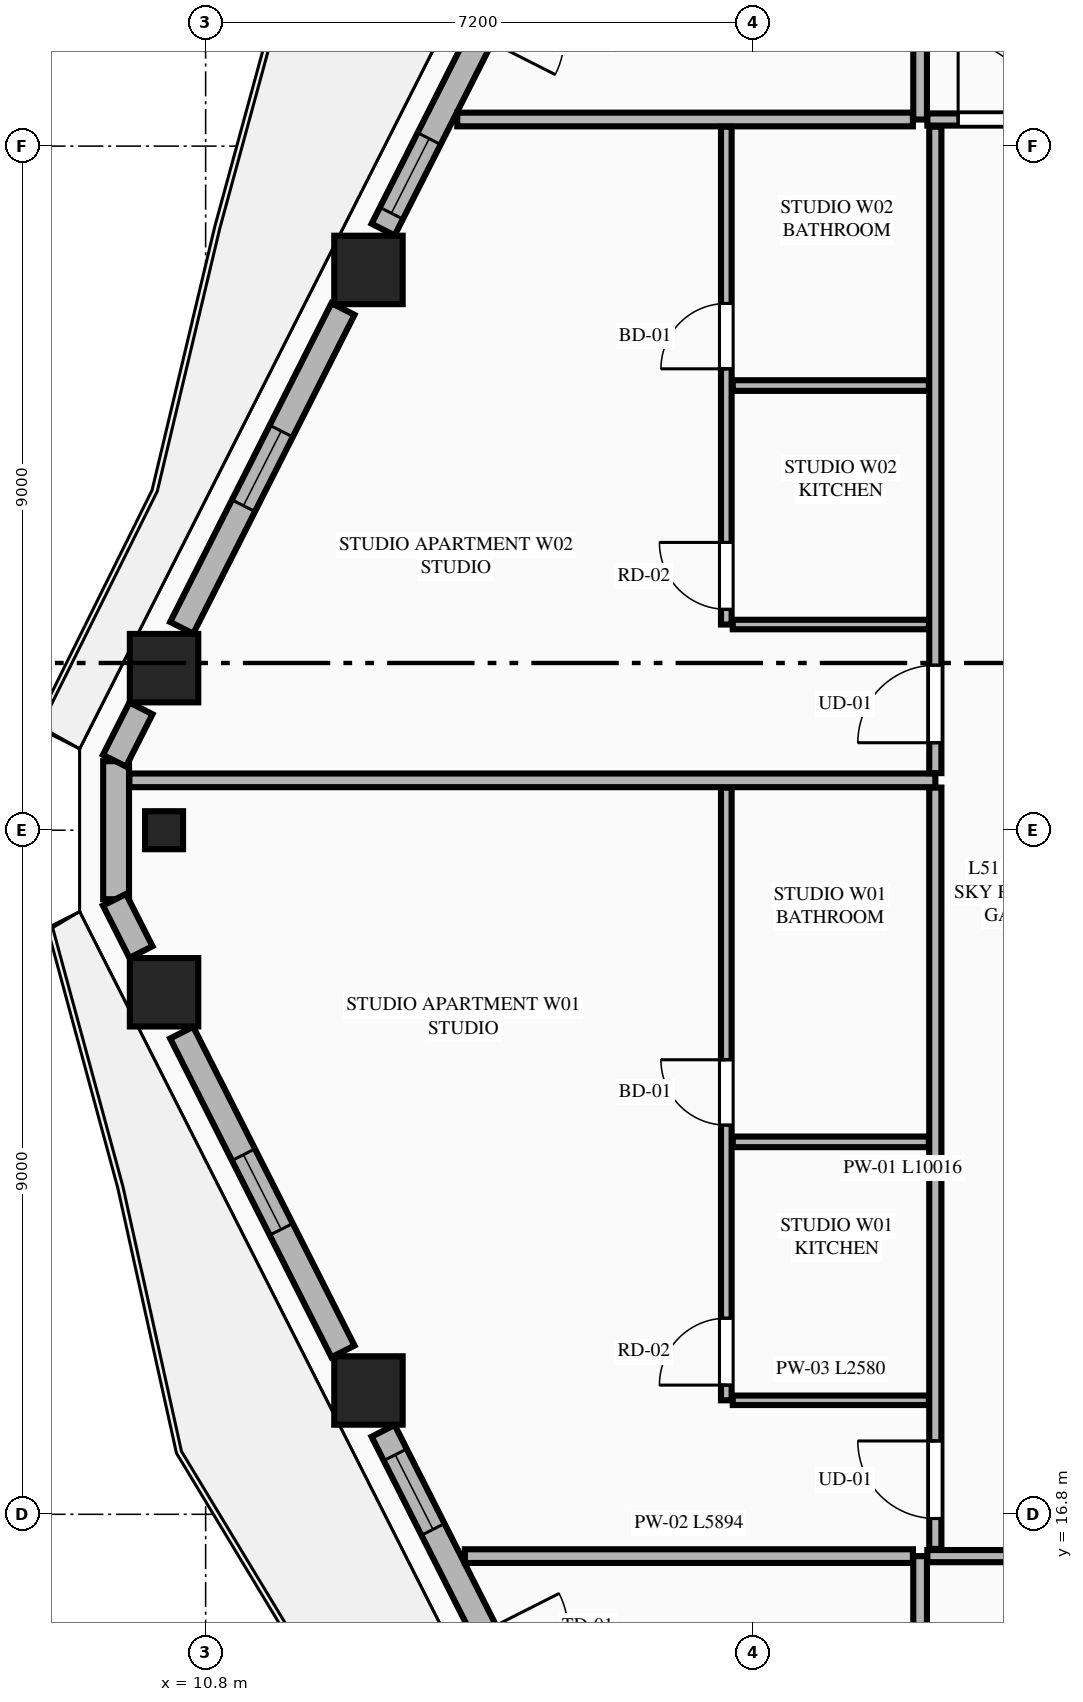
"""IFC4 building model, lengths in metres.
Left out: names, types, materials, properties, quantities, classifications, styles, units other than length and angle.
Written with IfcOpenShell. Run it as: python <this file> out.ifc"""

import sys

from ifc_helpers import new_model, si_unit, direction, frame, frame_2d, origin, origin_2d, place, context, subcontext, project, spatial, rectangle, extrude, element, fill, save


model = new_model("IFC4")
c1 = context("Model", 3, precision=1e-05, world=origin(), true_north=direction((0.0, 1.0)))
c2 = subcontext(c1, "Body", "Model", "MODEL_VIEW")
j1 = project(units=[si_unit("LENGTHUNIT", "METRE"), si_unit("PLANEANGLEUNIT", "RADIAN")], contexts=[c1])
p1 = place(None, origin())
s1 = spatial("IfcSite", under=j1, at=p1, CompositionType="ELEMENT")
p2 = place(p1, origin())
s2 = spatial("IfcBuilding", under=s1, at=p2, CompositionType="ELEMENT")
p3 = place(p2, frame((0.0, 0.0, 193.2)))
s3 = spatial("IfcBuildingStorey", under=s2, at=p3, CompositionType="ELEMENT", Elevation=193.2)
for number, where, z_axis, x_axis in (
    (1, (12.942, 33.171, 0.0), (0.0, 0.0, 1.0), (1.0, 0.0, 0.0)),
    (2, (10.253, 27.932, 0.0), (0.0, 0.0, 1.0), (1.0, 0.0, 0.0)),
    (3, (10.253, 23.668, 0.0), (0.0, 0.0, 1.0), (1.0, 0.0, 0.0)),
    (4, (12.942, 18.429, 0.0), (0.0, 0.0, 1.0), (1.0, 0.0, 0.0)),
):
    element("IfcColumn", number, at=place(p3, frame(where, z_axis=z_axis, x_axis=x_axis)), inside=s3, PredefinedType="COLUMN", context=c2, shape_type="SweptSolid", body=[
        extrude(rectangle(XDim=0.9, YDim=0.9, at=origin_2d()), origin(), (0.0, 0.0, 1.0), 3.55),
    ])
p4 = place(p3, frame((10.253, 25.8, 0.0), z_axis=(0.0, 0.0, 1.0), x_axis=(0.0, -1.0, 0.0)))
e5 = element("IfcColumn", 5, at=p4, inside=s3, PredefinedType="PILASTER", context=c2, shape_type="SweptSolid", body=[
    extrude(rectangle(XDim=0.5, YDim=0.35, at=origin_2d()), origin(), (0.0, 0.0, 1.0), 3.55),
])
p5 = place(p3, frame((9.622, 26.708, 0.0), z_axis=(0.0, 0.0, 1.0), x_axis=(0.0, -1.0, 0.0)))
e6 = element("IfcWall", 6, at=p5, inside=s3, PredefinedType="STANDARD", context=c2, shape_type="SweptSolid", body=[
    extrude(rectangle(XDim=1.816, YDim=0.34, at=frame_2d((0.908, 0.0))), origin(), (0.0, 0.0, 1.0), 3.35),
])
p6 = place(p3, frame((15.352, 38.083, 0.0), z_axis=(0.0, 0.0, 1.0), x_axis=(-0.451524246964, -0.89225884944, 0.0)))
e7 = element("IfcWall", 7, at=p6, inside=s3, PredefinedType="STANDARD", context=c2, shape_type="SweptSolid", body=[
    extrude(rectangle(XDim=4.91, YDim=0.34, at=frame_2d((2.455, 0.0))), origin(), (0.0, 0.0, 1.0), 2.883),
])
p7 = place(p6, frame((0.968, 0.0, 0.0)))
e8 = element("IfcOpeningElement", 8, at=p7, cuts=e7, PredefinedType="OPENING", context=c2, shape_type="SweptSolid", body=[
    extrude(rectangle(XDim=1.1, YDim=2.25, at=frame_2d((0.55, 1.125))), frame((0.0, 0.18, 0.0), z_axis=(0.0, -1.0, 0.0), x_axis=(1.0, 0.0, 0.0)), (0.0, 0.0, 1.0), 0.36),
])
p8 = place(p6, frame((3.569, 0.0, 0.75)))
e9 = element("IfcOpeningElement", 9, at=p8, cuts=e7, PredefinedType="OPENING", context=c2, shape_type="SweptSolid", body=[
    extrude(rectangle(XDim=1.1, YDim=1.983, at=frame_2d((0.55, 0.991))), frame((0.0, 0.18, 0.0), z_axis=(0.0, -1.0, 0.0), x_axis=(1.0, 0.0, 0.0)), (0.0, 0.0, 1.0), 0.36),
])
p9 = place(p3, frame((12.607, 32.657, 0.0), z_axis=(0.0, 0.0, 1.0), x_axis=(-0.451426298588, -0.892308409096, 0.0)))
e10 = element("IfcWall", 10, at=p9, inside=s3, PredefinedType="STANDARD", context=c2, shape_type="SweptSolid", body=[
    extrude(rectangle(XDim=4.7, YDim=0.34, at=frame_2d((2.35, 0.0))), origin(), (0.0, 0.0, 1.0), 2.883),
])
p10 = place(p9, frame((1.8, 0.0, 0.75)))
e11 = element("IfcOpeningElement", 11, at=p10, cuts=e10, PredefinedType="OPENING", context=c2, shape_type="SweptSolid", body=[
    extrude(rectangle(XDim=1.1, YDim=1.983, at=frame_2d((0.55, 0.991))), frame((0.0, 0.18, 0.0), z_axis=(0.0, -1.0, 0.0), x_axis=(1.0, 0.0, 0.0)), (0.0, 0.0, 1.0), 0.36),
])
for number, where, z_axis, x_axis in (
    (12, (9.949, 27.403, 0.0), (0.0, 0.0, 1.0), (-0.451, -0.892, 0.0)),
    (13, (9.601, 24.885, 0.0), (0.0, 0.0, 1.0), (0.451, -0.892, 0.0)),
):
    element("IfcWall", number, at=place(p3, frame(where, z_axis=z_axis, x_axis=x_axis)), inside=s3, PredefinedType="STANDARD", context=c2, shape_type="SweptSolid", body=[
        extrude(rectangle(XDim=0.771, YDim=0.34, at=frame_2d((0.385, 0.0))), origin(), (0.0, 0.0, 1.0), 3.35),
    ])
p11 = place(p3, frame((10.485, 23.137, 0.0), z_axis=(0.0, 0.0, 1.0), x_axis=(0.451447222193, -0.892297823361, 0.0)))
e14 = element("IfcWall", 14, at=p11, inside=s3, PredefinedType="STANDARD", context=c2, shape_type="SweptSolid", body=[
    extrude(rectangle(XDim=4.7, YDim=0.34, at=frame_2d((2.35, 0.0))), origin(), (0.0, 0.0, 1.0), 2.883),
])
p12 = place(p11, frame((1.8, 0.0, 0.75)))
e15 = element("IfcOpeningElement", 15, at=p12, cuts=e14, PredefinedType="OPENING", context=c2, shape_type="SweptSolid", body=[
    extrude(rectangle(XDim=1.1, YDim=1.983, at=frame_2d((0.55, 0.991))), frame((0.0, 0.18, 0.0), z_axis=(0.0, -1.0, 0.0), x_axis=(1.0, 0.0, 0.0)), (0.0, 0.0, 1.0), 0.36),
])
p13 = place(p3, frame((13.135, 17.898, 0.0), z_axis=(0.0, 0.0, 1.0), x_axis=(0.451544279509, -0.892248711763, 0.0)))
e16 = element("IfcWall", 16, at=p13, inside=s3, PredefinedType="STANDARD", context=c2, shape_type="SweptSolid", body=[
    extrude(rectangle(XDim=4.91, YDim=0.34, at=frame_2d((2.455, 0.0))), origin(), (0.0, 0.0, 1.0), 2.883),
])
p14 = place(p13, frame((2.954, 0.0, 0.0)))
e17 = element("IfcOpeningElement", 17, at=p14, cuts=e16, PredefinedType="OPENING", context=c2, shape_type="SweptSolid", body=[
    extrude(rectangle(XDim=1.1, YDim=2.25, at=frame_2d((0.55, 1.125))), frame((0.0, 0.18, 0.0), z_axis=(0.0, -1.0, 0.0), x_axis=(1.0, 0.0, 0.0)), (0.0, 0.0, 1.0), 0.36),
])
p15 = place(p13, frame((0.353, 0.0, 0.75)))
e18 = element("IfcOpeningElement", 18, at=p15, cuts=e16, PredefinedType="OPENING", context=c2, shape_type="SweptSolid", body=[
    extrude(rectangle(XDim=1.1, YDim=1.983, at=frame_2d((0.55, 0.991))), frame((0.0, 0.18, 0.0), z_axis=(0.0, -1.0, 0.0), x_axis=(1.0, 0.0, 0.0)), (0.0, 0.0, 1.0), 0.36),
])
p16 = place(p3, frame((20.2, 5.968, 0.0), z_axis=(0.0, 0.0, 1.0), x_axis=(0.0, 1.0, 0.0)))
e19 = element("IfcWall", 19, at=p16, inside=s3, PredefinedType="PARTITIONING", context=c2, shape_type="SweptSolid", body=[
    extrude(rectangle(XDim=10.282, YDim=0.18, at=frame_2d((5.141, 0.0))), origin(), (0.0, 0.0, 1.0), 3.35),
])
p17 = place(p3, frame((20.295, 16.25, 0.0), z_axis=(0.0, 0.0, 1.0), x_axis=(1.0, 0.0, 0.0)))
e20 = element("IfcWall", 20, at=p17, inside=s3, PredefinedType="PARTITIONING", context=c2, shape_type="SweptSolid", body=[
    extrude(rectangle(XDim=24.21, YDim=0.16, at=frame_2d((12.105, 0.0))), origin(), (0.0, 0.0, 1.0), 3.35),
])
p18 = place(p17, frame((22.005, 0.0, 0.0)))
e21 = element("IfcOpeningElement", 21, at=p18, cuts=e20, PredefinedType="OPENING", context=c2, shape_type="SweptSolid", body=[
    extrude(rectangle(XDim=1.02, YDim=2.25, at=frame_2d((0.51, 1.125))), frame((0.0, 0.09, 0.0), z_axis=(0.0, -1.0, 0.0), x_axis=(1.0, 0.0, 0.0)), (0.0, 0.0, 1.0), 0.18),
])
p19 = place(p3, frame((20.2, 35.15, 0.0), z_axis=(0.0, 0.0, 1.0), x_axis=(0.0, 1.0, 0.0)))
e22 = element("IfcWall", 22, at=p19, inside=s3, PredefinedType="PARTITIONING", context=c2, shape_type="SweptSolid", body=[
    extrude(rectangle(XDim=10.482, YDim=0.18, at=frame_2d((5.241, 0.0))), origin(), (0.0, 0.0, 1.0), 3.35),
])
p20 = place(p3, frame((20.295, 35.15, 0.0), z_axis=(0.0, 0.0, 1.0), x_axis=(1.0, 0.0, 0.0)))
e23 = element("IfcWall", 23, at=p20, inside=s3, PredefinedType="PARTITIONING", context=c2, shape_type="SweptSolid", body=[
    extrude(rectangle(XDim=8.467, YDim=0.16, at=frame_2d((4.233, 0.0))), origin(), (0.0, 0.0, 1.0), 3.35),
])
p21 = place(p20, frame((0.405, 0.0, 0.0)))
e24 = element("IfcOpeningElement", 24, at=p21, cuts=e23, PredefinedType="OPENING", context=c2, shape_type="SweptSolid", body=[
    extrude(rectangle(XDim=1.02, YDim=2.25, at=frame_2d((0.51, 1.125))), frame((0.0, 0.09, 0.0), z_axis=(0.0, -1.0, 0.0), x_axis=(1.0, 0.0, 0.0)), (0.0, 0.0, 1.0), 0.18),
])
p22 = place(p3, frame((14.211, 16.25, 0.0), z_axis=(0.0, 0.0, 1.0), x_axis=(1.0, 0.0, 0.0)))
e25 = element("IfcWall", 25, at=p22, inside=s3, PredefinedType="PARTITIONING", context=c2, shape_type="SweptSolid", body=[
    extrude(rectangle(XDim=5.894, YDim=0.18, at=frame_2d((2.947, 0.0))), origin(), (0.0, 0.0, 1.0), 3.35),
])
p23 = place(p3, frame((14.11, 35.15, 0.0), z_axis=(0.0, 0.0, 1.0), x_axis=(1.0, 0.0, 0.0)))
e26 = element("IfcWall", 26, at=p23, inside=s3, PredefinedType="PARTITIONING", context=c2, shape_type="SweptSolid", body=[
    extrude(rectangle(XDim=5.995, YDim=0.18, at=frame_2d((2.998, 0.0))), origin(), (0.0, 0.0, 1.0), 3.35),
])
p24 = place(p3, frame((20.4, 16.345, 0.0), z_axis=(0.0, 0.0, 1.0), x_axis=(0.0, 1.0, 0.0)))
e27 = element("IfcWall", 27, at=p24, inside=s3, PredefinedType="PARTITIONING", context=c2, shape_type="SweptSolid", body=[
    extrude(rectangle(XDim=10.016, YDim=0.16, at=frame_2d((5.008, 0.0))), origin(), (0.0, 0.0, 1.0), 3.35),
])
p25 = place(p24, frame((0.4, 0.0, 0.0)))
e28 = element("IfcOpeningElement", 28, at=p25, cuts=e27, PredefinedType="OPENING", context=c2, shape_type="SweptSolid", body=[
    extrude(rectangle(XDim=1.02, YDim=2.25, at=frame_2d((0.51, 1.125))), frame((0.0, 0.09, 0.0), z_axis=(0.0, -1.0, 0.0), x_axis=(1.0, 0.0, 0.0)), (0.0, 0.0, 1.0), 0.18),
])
p26 = place(p3, frame((17.735, 18.3, 0.0), z_axis=(0.0, 0.0, 1.0), x_axis=(1.0, 0.0, 0.0)))
e29 = element("IfcWall", 29, at=p26, inside=s3, PredefinedType="PARTITIONING", context=c2, shape_type="SweptSolid", body=[
    extrude(rectangle(XDim=2.58, YDim=0.125, at=frame_2d((1.29, 0.0))), origin(), (0.0, 0.0, 1.0), 2.807),
])
p27 = place(p3, frame((17.65, 18.3, 0.0), z_axis=(0.0, 0.0, 1.0), x_axis=(0.0, 1.0, 0.0)))
e30 = element("IfcWall", 30, at=p27, inside=s3, PredefinedType="PLUMBINGWALL", context=c2, shape_type="SweptSolid", body=[
    extrude(rectangle(XDim=8.061, YDim=0.14, at=frame_2d((4.031, 0.0))), origin(), (0.0, 0.0, 1.0), 3.35),
])
p28 = place(p27, frame((3.62, 0.0, 0.0)))
e31 = element("IfcOpeningElement", 31, at=p28, cuts=e30, PredefinedType="OPENING", context=c2, shape_type="SweptSolid", body=[
    extrude(rectangle(XDim=0.86, YDim=2.1, at=frame_2d((0.43, 1.05))), frame((0.0, 0.08, 0.0), z_axis=(0.0, -1.0, 0.0), x_axis=(1.0, 0.0, 0.0)), (0.0, 0.0, 1.0), 0.16),
])
p29 = place(p27, frame((0.2, 0.0, 0.0)))
e32 = element("IfcOpeningElement", 32, at=p29, cuts=e30, PredefinedType="OPENING", context=c2, shape_type="SweptSolid", body=[
    extrude(rectangle(XDim=0.88, YDim=2.15, at=frame_2d((0.44, 1.075))), frame((0.0, 0.08, 0.0), z_axis=(0.0, -1.0, 0.0), x_axis=(1.0, 0.0, 0.0)), (0.0, 0.0, 1.0), 0.16),
])
p30 = place(p3, frame((17.735, 21.7, 0.0), z_axis=(0.0, 0.0, 1.0), x_axis=(1.0, 0.0, 0.0)))
e33 = element("IfcWall", 33, at=p30, inside=s3, PredefinedType="PLUMBINGWALL", context=c2, shape_type="SweptSolid", body=[
    extrude(rectangle(XDim=2.58, YDim=0.14, at=frame_2d((1.29, 0.0))), origin(), (0.0, 0.0, 1.0), 3.35),
])
p31 = place(p3, frame((9.797, 26.456, 0.0), z_axis=(0.0, 0.0, 1.0), x_axis=(1.0, 0.0, 0.0)))
e34 = element("IfcWall", 34, at=p31, inside=s3, PredefinedType="PARTITIONING", context=c2, shape_type="SweptSolid", body=[
    extrude(rectangle(XDim=10.603, YDim=0.18, at=frame_2d((5.301, 0.0))), origin(), (0.0, 0.0, 1.0), 3.35),
])
p32 = place(p3, frame((20.4, 26.551, 0.0), z_axis=(0.0, 0.0, 1.0), x_axis=(0.0, 1.0, 0.0)))
e35 = element("IfcWall", 35, at=p32, inside=s3, PredefinedType="PARTITIONING", context=c2, shape_type="SweptSolid", body=[
    extrude(rectangle(XDim=8.504, YDim=0.16, at=frame_2d((4.252, 0.0))), origin(), (0.0, 0.0, 1.0), 3.35),
])
p33 = place(p32, frame((0.4, 0.0, 0.0)))
e36 = element("IfcOpeningElement", 36, at=p33, cuts=e35, PredefinedType="OPENING", context=c2, shape_type="SweptSolid", body=[
    extrude(rectangle(XDim=1.02, YDim=2.25, at=frame_2d((0.51, 1.125))), frame((0.0, 0.09, 0.0), z_axis=(0.0, -1.0, 0.0), x_axis=(1.0, 0.0, 0.0)), (0.0, 0.0, 1.0), 0.18),
])
p34 = place(p3, frame((17.735, 28.506, 0.0), z_axis=(0.0, 0.0, 1.0), x_axis=(1.0, 0.0, 0.0)))
e37 = element("IfcWall", 37, at=p34, inside=s3, PredefinedType="PARTITIONING", context=c2, shape_type="SweptSolid", body=[
    extrude(rectangle(XDim=2.58, YDim=0.125, at=frame_2d((1.29, 0.0))), origin(), (0.0, 0.0, 1.0), 3.35),
])
p35 = place(p3, frame((17.65, 28.506, 0.0), z_axis=(0.0, 0.0, 1.0), x_axis=(0.0, 1.0, 0.0)))
e38 = element("IfcWall", 38, at=p35, inside=s3, PredefinedType="PLUMBINGWALL", context=c2, shape_type="SweptSolid", body=[
    extrude(rectangle(XDim=6.549, YDim=0.14, at=frame_2d((3.274, 0.0))), origin(), (0.0, 0.0, 1.0), 3.35),
])
p36 = place(p35, frame((3.364, 0.0, 0.0)))
e39 = element("IfcOpeningElement", 39, at=p36, cuts=e38, PredefinedType="OPENING", context=c2, shape_type="SweptSolid", body=[
    extrude(rectangle(XDim=0.86, YDim=2.1, at=frame_2d((0.43, 1.05))), frame((0.0, 0.08, 0.0), z_axis=(0.0, -1.0, 0.0), x_axis=(1.0, 0.0, 0.0)), (0.0, 0.0, 1.0), 0.16),
])
p37 = place(p35, frame((0.2, 0.0, 0.0)))
e40 = element("IfcOpeningElement", 40, at=p37, cuts=e38, PredefinedType="OPENING", context=c2, shape_type="SweptSolid", body=[
    extrude(rectangle(XDim=0.88, YDim=2.15, at=frame_2d((0.44, 1.075))), frame((0.0, 0.08, 0.0), z_axis=(0.0, -1.0, 0.0), x_axis=(1.0, 0.0, 0.0)), (0.0, 0.0, 1.0), 0.16),
])
p38 = place(p3, frame((17.735, 31.65, 0.0), z_axis=(0.0, 0.0, 1.0), x_axis=(1.0, 0.0, 0.0)))
e41 = element("IfcWall", 41, at=p38, inside=s3, PredefinedType="PLUMBINGWALL", context=c2, shape_type="SweptSolid", body=[
    extrude(rectangle(XDim=2.58, YDim=0.14, at=frame_2d((1.29, 0.0))), origin(), (0.0, 0.0, 1.0), 3.35),
])
p39 = place(p10, origin())
e42 = element("IfcWindow", 42, at=p39, inside=s3, PartitioningType="SINGLE_PANEL", PredefinedType="WINDOW", context=c2, shape_type="SweptSolid", body=[
    extrude(rectangle(XDim=1.1, YDim=1.983, at=frame_2d((0.55, 0.991))), frame((0.0, 0.03, 0.0), z_axis=(0.0, -1.0, 0.0), x_axis=(1.0, 0.0, 0.0)), (0.0, 0.0, 1.0), 0.06),
])
fill(e11, e42)
p40 = place(p12, origin())
e43 = element("IfcWindow", 43, at=p40, inside=s3, PartitioningType="SINGLE_PANEL", PredefinedType="WINDOW", context=c2, shape_type="SweptSolid", body=[
    extrude(rectangle(XDim=1.1, YDim=1.983, at=frame_2d((0.55, 0.991))), frame((0.0, 0.03, 0.0), z_axis=(0.0, -1.0, 0.0), x_axis=(1.0, 0.0, 0.0)), (0.0, 0.0, 1.0), 0.06),
])
fill(e15, e43)
p41 = place(p21, origin())
e44 = element("IfcDoor", 44, at=p41, inside=s3, OperationType="SINGLE_SWING_LEFT", PredefinedType="DOOR", context=c2, shape_type="SweptSolid", body=[
    extrude(rectangle(XDim=1.02, YDim=2.25, at=frame_2d((0.51, 1.125))), frame((0.0, 0.025, 0.0), z_axis=(0.0, -1.0, 0.0), x_axis=(1.0, 0.0, 0.0)), (0.0, 0.0, 1.0), 0.05),
])
fill(e24, e44)
p42 = place(p28, origin())
e45 = element("IfcDoor", 45, at=p42, inside=s3, OperationType="SINGLE_SWING_RIGHT", PredefinedType="DOOR", context=c2, shape_type="SweptSolid", body=[
    extrude(rectangle(XDim=0.86, YDim=2.1, at=frame_2d((0.43, 1.05))), frame((0.0, 0.025, 0.0), z_axis=(0.0, -1.0, 0.0), x_axis=(1.0, 0.0, 0.0)), (0.0, 0.0, 1.0), 0.05),
])
fill(e31, e45)
p43 = place(p25, origin())
e46 = element("IfcDoor", 46, at=p43, inside=s3, OperationType="SINGLE_SWING_RIGHT", PredefinedType="DOOR", context=c2, shape_type="SweptSolid", body=[
    extrude(rectangle(XDim=1.02, YDim=2.25, at=frame_2d((0.51, 1.125))), frame((0.0, 0.025, 0.0), z_axis=(0.0, -1.0, 0.0), x_axis=(1.0, 0.0, 0.0)), (0.0, 0.0, 1.0), 0.05),
])
fill(e28, e46)
p44 = place(p29, origin())
e47 = element("IfcDoor", 47, at=p44, inside=s3, OperationType="SINGLE_SWING_LEFT", PredefinedType="DOOR", context=c2, shape_type="SweptSolid", body=[
    extrude(rectangle(XDim=0.88, YDim=2.15, at=frame_2d((0.44, 1.075))), frame((0.0, 0.025, 0.0), z_axis=(0.0, -1.0, 0.0), x_axis=(1.0, 0.0, 0.0)), (0.0, 0.0, 1.0), 0.05),
])
fill(e32, e47)
p45 = place(p36, origin())
e48 = element("IfcDoor", 48, at=p45, inside=s3, OperationType="SINGLE_SWING_LEFT", PredefinedType="DOOR", context=c2, shape_type="SweptSolid", body=[
    extrude(rectangle(XDim=0.86, YDim=2.1, at=frame_2d((0.43, 1.05))), frame((0.0, 0.025, 0.0), z_axis=(0.0, -1.0, 0.0), x_axis=(1.0, 0.0, 0.0)), (0.0, 0.0, 1.0), 0.05),
])
fill(e39, e48)
p46 = place(p33, origin())
e49 = element("IfcDoor", 49, at=p46, inside=s3, OperationType="SINGLE_SWING_LEFT", PredefinedType="DOOR", context=c2, shape_type="SweptSolid", body=[
    extrude(rectangle(XDim=1.02, YDim=2.25, at=frame_2d((0.51, 1.125))), frame((0.0, 0.025, 0.0), z_axis=(0.0, -1.0, 0.0), x_axis=(1.0, 0.0, 0.0)), (0.0, 0.0, 1.0), 0.05),
])
fill(e36, e49)
p47 = place(p37, origin())
e50 = element("IfcDoor", 50, at=p47, inside=s3, OperationType="SINGLE_SWING_RIGHT", PredefinedType="DOOR", context=c2, shape_type="SweptSolid", body=[
    extrude(rectangle(XDim=0.88, YDim=2.15, at=frame_2d((0.44, 1.075))), frame((0.0, 0.025, 0.0), z_axis=(0.0, -1.0, 0.0), x_axis=(1.0, 0.0, 0.0)), (0.0, 0.0, 1.0), 0.05),
])
fill(e40, e50)
p48 = place(p8, origin())
e51 = element("IfcWindow", 51, at=p48, inside=s3, PartitioningType="SINGLE_PANEL", PredefinedType="WINDOW", context=c2, shape_type="SweptSolid", body=[
    extrude(rectangle(XDim=1.1, YDim=1.983, at=frame_2d((0.55, 0.991))), frame((0.0, 0.03, 0.0), z_axis=(0.0, -1.0, 0.0), x_axis=(1.0, 0.0, 0.0)), (0.0, 0.0, 1.0), 0.06),
])
fill(e9, e51)
p49 = place(p15, origin())
e52 = element("IfcWindow", 52, at=p49, inside=s3, PartitioningType="SINGLE_PANEL", PredefinedType="WINDOW", context=c2, shape_type="SweptSolid", body=[
    extrude(rectangle(XDim=1.1, YDim=1.983, at=frame_2d((0.55, 0.991))), frame((0.0, 0.03, 0.0), z_axis=(0.0, -1.0, 0.0), x_axis=(1.0, 0.0, 0.0)), (0.0, 0.0, 1.0), 0.06),
])
fill(e18, e52)
save(model, sys.argv[1])
